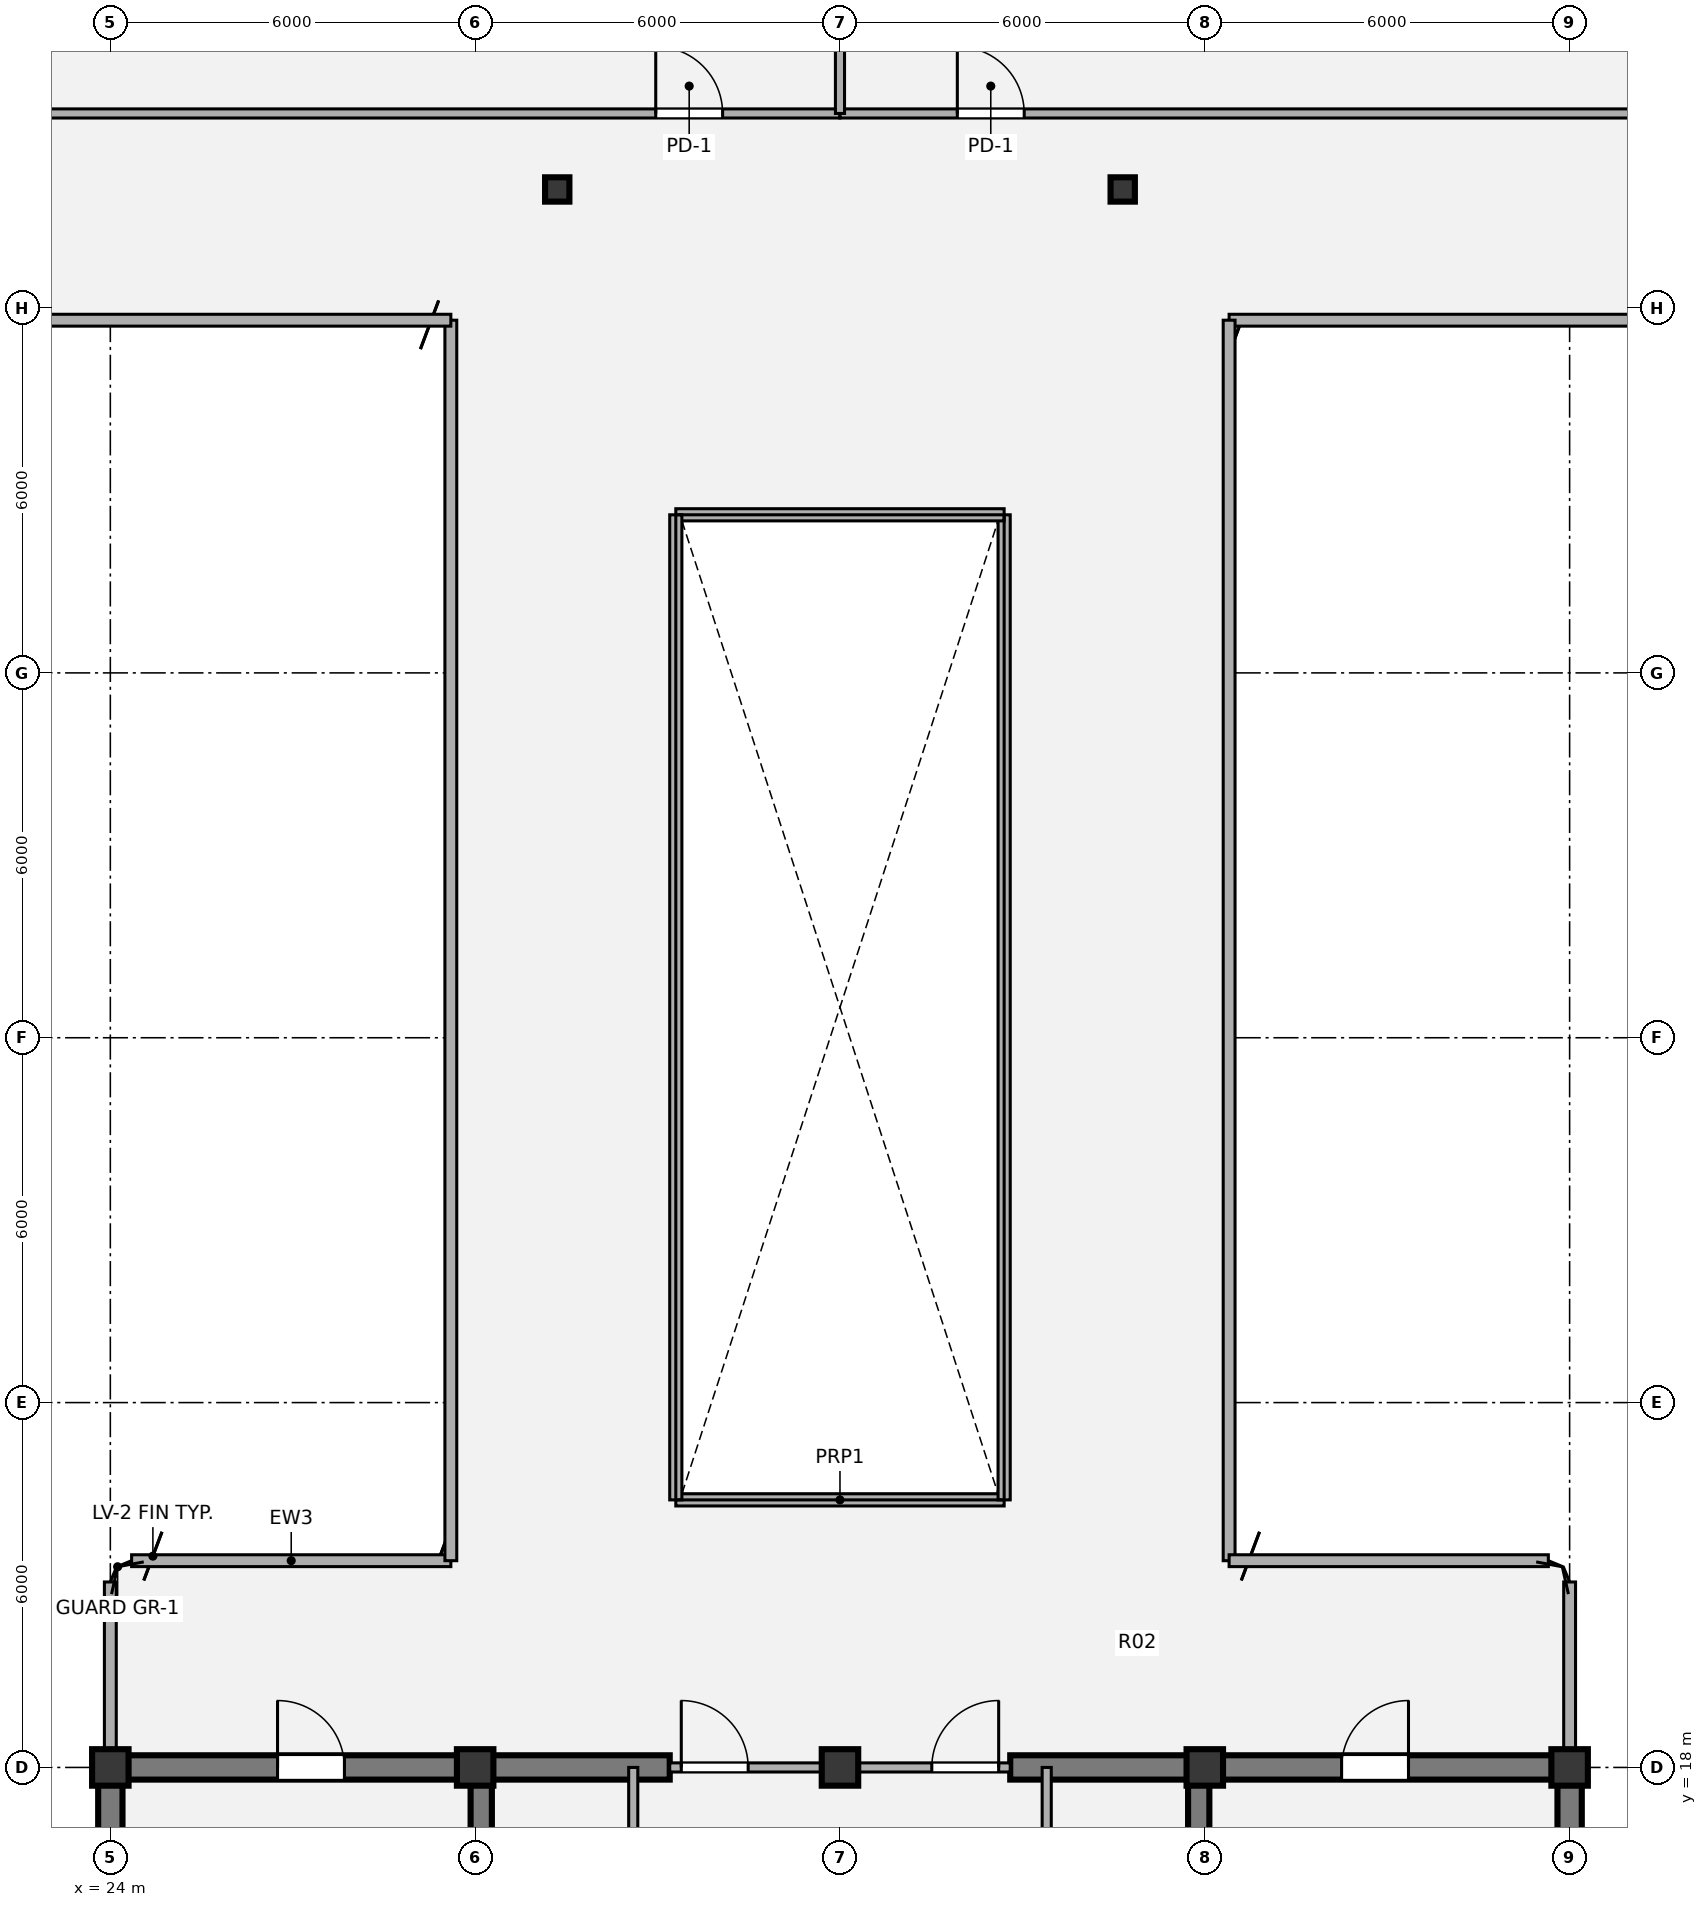
"""IFC4 building model, lengths in metres.
Left out: names, types, materials, properties, quantities, classifications, styles, units other than length and angle.
Written with IfcOpenShell. Run it as: python <this file> out.ifc"""

import sys

from ifc_helpers import new_model, si_unit, direction, frame, frame_2d, origin, origin_2d, place, context, subcontext, project, spatial, rectangle, hollow_rectangle, extrude, source, transform, mapped, element, fill, save


model = new_model("IFC4")
c1 = context("Model", 3, precision=1e-05, world=origin(), true_north=direction((0.0, 1.0)))
c2 = subcontext(c1, "Body", "Model", "MODEL_VIEW")
j1 = project(units=[si_unit("LENGTHUNIT", "METRE"), si_unit("PLANEANGLEUNIT", "RADIAN")], contexts=[c1])
p1 = place(None, origin())
s1 = spatial("IfcSite", under=j1, at=p1, CompositionType="ELEMENT")
p2 = place(p1, origin())
s2 = spatial("IfcBuilding", under=s1, at=p2, CompositionType="ELEMENT")
p3 = place(p2, frame((0.0, 0.0, 295.92)))
s3 = spatial("IfcBuildingStorey", under=s2, at=p3, CompositionType="ELEMENT", Elevation=295.92)
m1 = source(origin(), c2, "Body", "SweptSolid", [
    extrude(rectangle(XDim=0.6, YDim=0.6, at=origin_2d()), origin(), (0.0, 0.0, 1.0), 3.96),
])
for number, where, z_axis, x_axis in (
    (1, (24.0, 18.0, 0.0), (0.0, 0.0, 1.0), (1.0, 0.0, 0.0)),
    (2, (30.0, 18.0, 0.0), (0.0, 0.0, 1.0), (1.0, 0.0, 0.0)),
    (3, (36.0, 18.0, 0.0), (0.0, 0.0, 1.0), (1.0, 0.0, 0.0)),
    (4, (42.0, 18.0, 0.0), (0.0, 0.0, 1.0), (1.0, 0.0, 0.0)),
    (5, (48.0, 18.0, 0.0), (0.0, 0.0, 1.0), (1.0, 0.0, 0.0)),
):
    element("IfcColumn", number, at=place(p3, frame(where, z_axis=z_axis, x_axis=x_axis)), inside=s3, PredefinedType="COLUMN", context=c2, shape_type="MappedRepresentation", body=[
        mapped(m1, transform((0.0, 0.0, 0.0), x_axis=(1.0, 0.0, 0.0), y_axis=(0.0, 1.0, 0.0), z_axis=(0.0, 0.0, 1.0), scale=1.0)),
    ])
for number, where, z_axis, x_axis in (
    (6, (24.0, 6.0, 0.0), (0.0, 0.0, 1.0), (0.0, 1.0, 0.0)),
    (7, (48.0, 18.0, 0.0), (0.0, 0.0, 1.0), (0.0, -1.0, 0.0)),
):
    element("IfcWall", number, at=place(p3, frame(where, z_axis=z_axis, x_axis=x_axis)), inside=s3, PredefinedType="SHEAR", context=c2, shape_type="SweptSolid", body=[
        extrude(rectangle(XDim=12.0, YDim=0.4, at=frame_2d((6.0, 0.0))), origin(), (0.0, 0.0, 1.0), 3.96),
    ])
p4 = place(p3, frame((23.8, 18.0, 0.0), z_axis=(0.0, 0.0, 1.0), x_axis=(1.0, 0.0, 0.0)))
e8 = element("IfcWall", 8, at=p4, inside=s3, PredefinedType="SHEAR", context=c2, shape_type="SweptSolid", body=[
    extrude(rectangle(XDim=9.4, YDim=0.4, at=frame_2d((4.7, 0.0))), origin(), (0.0, 0.0, 1.0), 3.96),
])
p5 = place(p4, frame((2.95, 0.0, 0.0)))
e9 = element("IfcOpeningElement", 9, at=p5, cuts=e8, PredefinedType="OPENING", context=c2, shape_type="SweptSolid", body=[
    extrude(rectangle(XDim=1.1, YDim=2.1, at=origin_2d()), frame((0.55, 0.21, 1.05), z_axis=(0.0, -1.0, 0.0), x_axis=(1.0, 0.0, 0.0)), (0.0, 0.0, 1.0), 0.42),
])
p6 = place(p3, frame((38.8, 18.0, 0.0), z_axis=(0.0, 0.0, 1.0), x_axis=(1.0, 0.0, 0.0)))
e10 = element("IfcWall", 10, at=p6, inside=s3, PredefinedType="SHEAR", context=c2, shape_type="SweptSolid", body=[
    extrude(rectangle(XDim=9.4, YDim=0.4, at=frame_2d((4.7, 0.0))), origin(), (0.0, 0.0, 1.0), 3.96),
])
p7 = place(p6, frame((5.45, 0.0, 0.0)))
e11 = element("IfcOpeningElement", 11, at=p7, cuts=e10, PredefinedType="OPENING", context=c2, shape_type="SweptSolid", body=[
    extrude(rectangle(XDim=1.1, YDim=2.1, at=origin_2d()), frame((0.55, 0.21, 1.05), z_axis=(0.0, -1.0, 0.0), x_axis=(1.0, 0.0, 0.0)), (0.0, 0.0, 1.0), 0.42),
])
for number, where, z_axis, x_axis in (
    (12, (30.1, 6.0, 0.0), (0.0, 0.0, 1.0), (0.0, 1.0, 0.0)),
    (13, (41.9, 18.0, 0.0), (0.0, 0.0, 1.0), (0.0, -1.0, 0.0)),
):
    element("IfcWall", number, at=place(p3, frame(where, z_axis=z_axis, x_axis=x_axis)), inside=s3, PredefinedType="SHEAR", context=c2, shape_type="SweptSolid", body=[
        extrude(rectangle(XDim=12.0, YDim=0.35, at=frame_2d((6.0, 0.0))), origin(), (0.0, 0.0, 1.0), 3.96),
    ])
m2 = source(origin(), c2, "Body", "SweptSolid", [
    extrude(hollow_rectangle(XDim=0.4, YDim=0.4, WallThickness=0.02, OuterFilletRadius=0.04, at=origin_2d()), origin(), (0.0, 0.0, 1.0), 3.96),
])
for number, where, z_axis, x_axis in (
    (14, (31.35, 43.95, 0.0), (0.0, 0.0, 1.0), (1.0, 0.0, 0.0)),
    (15, (40.65, 43.95, 0.0), (0.0, 0.0, 1.0), (1.0, 0.0, 0.0)),
):
    element("IfcColumn", number, at=place(p3, frame(where, z_axis=z_axis, x_axis=x_axis)), inside=s3, PredefinedType="COLUMN", context=c2, shape_type="MappedRepresentation", body=[
        mapped(m2, transform((0.0, 0.0, 0.0), x_axis=(1.0, 0.0, 0.0), y_axis=(0.0, 1.0, 0.0), z_axis=(0.0, 0.0, 1.0), scale=1.0)),
    ])
for number, where, z_axis, x_axis in (
    (16, (48.0, 21.05, 0.0), (0.0, 0.0, 1.0), (0.0, -1.0, 0.0)),
    (17, (24.0, 18.28, 0.0), (0.0, 0.0, 1.0), (0.0, 1.0, 0.0)),
):
    element("IfcWall", number, at=place(p3, frame(where, z_axis=z_axis, x_axis=x_axis)), inside=s3, PredefinedType="SOLIDWALL", context=c2, shape_type="SweptSolid", body=[
        extrude(rectangle(XDim=2.77, YDim=0.195, at=frame_2d((1.385, 0.0))), origin(), (0.0, 0.0, 1.0), 2.898),
    ])
p8 = place(p3, frame((24.35, 21.4, 0.0), z_axis=(0.0, 0.0, 1.0), x_axis=(1.0, 0.0, 0.0)))
e18 = element("IfcWall", 18, at=p8, inside=s3, PredefinedType="SOLIDWALL", context=c2, shape_type="SweptSolid", body=[
    extrude(rectangle(XDim=5.25, YDim=0.195, at=frame_2d((2.625, 0.0))), origin(), (0.0, 0.0, 1.0), 3.71),
])
p9 = place(p3, frame((29.6, 21.4, 0.0), z_axis=(0.0, 0.0, 1.0), x_axis=(0.0, 1.0, 0.0)))
e19 = element("IfcWall", 19, at=p9, inside=s3, PredefinedType="SOLIDWALL", context=c2, shape_type="SweptSolid", body=[
    extrude(rectangle(XDim=20.4, YDim=0.195, at=frame_2d((10.2, 0.0))), origin(), (0.0, 0.0, 1.0), 2.998),
])
for number, where, z_axis, x_axis in (
    (20, (29.6, 41.8, 0.0), (0.0, 0.0, 1.0), (-1.0, 0.0, 0.0)),
    (21, (52.5, 41.8, 0.0), (0.0, 0.0, 1.0), (-1.0, 0.0, 0.0)),
):
    element("IfcWall", number, at=place(p3, frame(where, z_axis=z_axis, x_axis=x_axis)), inside=s3, PredefinedType="SOLIDWALL", context=c2, shape_type="SweptSolid", body=[
        extrude(rectangle(XDim=10.1, YDim=0.195, at=frame_2d((5.05, 0.0))), origin(), (0.0, 0.0, 1.0), 3.71),
    ])
p10 = place(p3, frame((42.4, 41.8, 0.0), z_axis=(0.0, 0.0, 1.0), x_axis=(0.0, -1.0, 0.0)))
e22 = element("IfcWall", 22, at=p10, inside=s3, PredefinedType="SOLIDWALL", context=c2, shape_type="SweptSolid", body=[
    extrude(rectangle(XDim=20.4, YDim=0.195, at=frame_2d((10.2, 0.0))), origin(), (0.0, 0.0, 1.0), 2.998),
])
p11 = place(p3, frame((42.4, 21.4, 0.0), z_axis=(0.0, 0.0, 1.0), x_axis=(1.0, 0.0, 0.0)))
e23 = element("IfcWall", 23, at=p11, inside=s3, PredefinedType="SOLIDWALL", context=c2, shape_type="SweptSolid", body=[
    extrude(rectangle(XDim=5.25, YDim=0.195, at=frame_2d((2.625, 0.0))), origin(), (0.0, 0.0, 1.0), 3.71),
])
p12 = place(p3, frame((33.3, 22.4, 0.0), z_axis=(0.0, 0.0, 1.0), x_axis=(1.0, 0.0, 0.0)))
e24 = element("IfcWall", 24, at=p12, inside=s3, PredefinedType="PARAPET", context=c2, shape_type="SweptSolid", body=[
    extrude(rectangle(XDim=5.4, YDim=0.2, at=frame_2d((2.7, 0.0))), origin(), (0.0, 0.0, 1.0), 1.22),
])
p13 = place(p3, frame((38.7, 22.4, 0.0), z_axis=(0.0, 0.0, 1.0), x_axis=(0.0, 1.0, 0.0)))
e25 = element("IfcWall", 25, at=p13, inside=s3, PredefinedType="PARAPET", context=c2, shape_type="SweptSolid", body=[
    extrude(rectangle(XDim=16.2, YDim=0.2, at=frame_2d((8.1, 0.0))), origin(), (0.0, 0.0, 1.0), 1.22),
])
p14 = place(p3, frame((38.7, 38.6, 0.0), z_axis=(0.0, 0.0, 1.0), x_axis=(-1.0, 0.0, 0.0)))
e26 = element("IfcWall", 26, at=p14, inside=s3, PredefinedType="PARAPET", context=c2, shape_type="SweptSolid", body=[
    extrude(rectangle(XDim=5.4, YDim=0.2, at=frame_2d((2.7, 0.0))), origin(), (0.0, 0.0, 1.0), 1.22),
])
p15 = place(p3, frame((33.3, 38.6, 0.0), z_axis=(0.0, 0.0, 1.0), x_axis=(0.0, -1.0, 0.0)))
e27 = element("IfcWall", 27, at=p15, inside=s3, PredefinedType="PARAPET", context=c2, shape_type="SweptSolid", body=[
    extrude(rectangle(XDim=16.2, YDim=0.2, at=frame_2d((8.1, 0.0))), origin(), (0.0, 0.0, 1.0), 1.22),
])
p16 = place(p3, frame((32.6, 11.0, 0.0), z_axis=(0.0, 0.0, 1.0), x_axis=(0.0, 1.0, 0.0)))
e28 = element("IfcWall", 28, at=p16, inside=s3, PredefinedType="PARTITIONING", context=c2, shape_type="SweptSolid", body=[
    extrude(rectangle(XDim=7.0, YDim=0.15, at=frame_2d((3.5, 0.0))), origin(), (0.0, 0.0, 1.0), 3.68),
])
p17 = place(p16, frame((2.4, 0.0, 0.0)))
e29 = element("IfcOpeningElement", 29, at=p17, cuts=e28, PredefinedType="OPENING", context=c2, shape_type="SweptSolid", body=[
    extrude(rectangle(XDim=1.1, YDim=2.1, at=origin_2d()), frame((0.55, 0.085, 1.05), z_axis=(0.0, -1.0, 0.0), x_axis=(1.0, 0.0, 0.0)), (0.0, 0.0, 1.0), 0.17),
])
p18 = place(p3, frame((39.4, 11.0, 0.0), z_axis=(0.0, 0.0, 1.0), x_axis=(0.0, 1.0, 0.0)))
e30 = element("IfcWall", 30, at=p18, inside=s3, PredefinedType="PARTITIONING", context=c2, shape_type="SweptSolid", body=[
    extrude(rectangle(XDim=7.0, YDim=0.15, at=frame_2d((3.5, 0.0))), origin(), (0.0, 0.0, 1.0), 3.68),
])
p19 = place(p18, frame((2.4, 0.0, 0.0)))
e31 = element("IfcOpeningElement", 31, at=p19, cuts=e30, PredefinedType="OPENING", context=c2, shape_type="SweptSolid", body=[
    extrude(rectangle(XDim=1.1, YDim=2.1, at=origin_2d()), frame((0.55, 0.085, 1.05), z_axis=(0.0, -1.0, 0.0), x_axis=(1.0, 0.0, 0.0)), (0.0, 0.0, 1.0), 0.17),
])
p20 = place(p3, frame((33.2, 18.0, 0.0), z_axis=(0.0, 0.0, 1.0), x_axis=(1.0, 0.0, 0.0)))
e32 = element("IfcWall", 32, at=p20, inside=s3, PredefinedType="PARTITIONING", context=c2, shape_type="SweptSolid", body=[
    extrude(rectangle(XDim=5.6, YDim=0.15, at=frame_2d((2.8, 0.0))), origin(), (0.0, 0.0, 1.0), 2.695),
])
p21 = place(p20, frame((0.19, 0.0, 0.0)))
e33 = element("IfcOpeningElement", 33, at=p21, cuts=e32, PredefinedType="OPENING", context=c2, shape_type="SweptSolid", body=[
    extrude(rectangle(XDim=1.1, YDim=2.1, at=origin_2d()), frame((0.55, 0.085, 1.05), z_axis=(0.0, -1.0, 0.0), x_axis=(1.0, 0.0, 0.0)), (0.0, 0.0, 1.0), 0.17),
])
p22 = place(p20, frame((4.31, 0.0, 0.0)))
e34 = element("IfcOpeningElement", 34, at=p22, cuts=e32, PredefinedType="OPENING", context=c2, shape_type="SweptSolid", body=[
    extrude(rectangle(XDim=1.1, YDim=2.1, at=origin_2d()), frame((0.55, 0.085, 1.05), z_axis=(0.0, -1.0, 0.0), x_axis=(1.0, 0.0, 0.0)), (0.0, 0.0, 1.0), 0.17),
])
p23 = place(p3, frame((18.9, 45.2, 0.0), z_axis=(0.0, 0.0, 1.0), x_axis=(1.0, 0.0, 0.0)))
e35 = element("IfcWall", 35, at=p23, inside=s3, PredefinedType="PARTITIONING", context=c2, shape_type="SweptSolid", body=[
    extrude(rectangle(XDim=17.1, YDim=0.15, at=frame_2d((8.55, 0.0))), origin(), (0.0, 0.0, 1.0), 3.162),
])
p24 = place(p23, frame((14.07, 0.0, 0.0)))
e36 = element("IfcOpeningElement", 36, at=p24, cuts=e35, PredefinedType="OPENING", context=c2, shape_type="SweptSolid", body=[
    extrude(rectangle(XDim=1.1, YDim=2.1, at=origin_2d()), frame((0.55, 0.085, 1.05), z_axis=(0.0, -1.0, 0.0), x_axis=(1.0, 0.0, 0.0)), (0.0, 0.0, 1.0), 0.17),
])
p25 = place(p3, frame((36.0, 45.2, 0.0), z_axis=(0.0, 0.0, 1.0), x_axis=(1.0, 0.0, 0.0)))
e37 = element("IfcWall", 37, at=p25, inside=s3, PredefinedType="PARTITIONING", context=c2, shape_type="SweptSolid", body=[
    extrude(rectangle(XDim=17.1, YDim=0.15, at=frame_2d((8.55, 0.0))), origin(), (0.0, 0.0, 1.0), 3.162),
])
p26 = place(p25, frame((1.93, 0.0, 0.0)))
e38 = element("IfcOpeningElement", 38, at=p26, cuts=e37, PredefinedType="OPENING", context=c2, shape_type="SweptSolid", body=[
    extrude(rectangle(XDim=1.1, YDim=2.1, at=origin_2d()), frame((0.55, 0.085, 1.05), z_axis=(0.0, -1.0, 0.0), x_axis=(1.0, 0.0, 0.0)), (0.0, 0.0, 1.0), 0.17),
])
p27 = place(p3, frame((36.0, 45.2, 0.0), z_axis=(0.0, 0.0, 1.0), x_axis=(0.0, 1.0, 0.0)))
e39 = element("IfcWall", 39, at=p27, inside=s3, PredefinedType="PARTITIONING", context=c2, shape_type="SweptSolid", body=[
    extrude(rectangle(XDim=7.6, YDim=0.15, at=frame_2d((3.8, 0.0))), origin(), (0.0, 0.0, 1.0), 3.68),
])
m3 = source(origin(), c2, "Body", "SweptSolid", [
    extrude(rectangle(XDim=1.1, YDim=2.1, at=origin_2d()), frame((0.55, 0.025, 1.05), z_axis=(0.0, -1.0, 0.0), x_axis=(1.0, 0.0, 0.0)), (0.0, 0.0, 1.0), 0.05),
])
p28 = place(p21, origin())
e40 = element("IfcDoor", 40, at=p28, inside=s3, OperationType="SINGLE_SWING_LEFT", PredefinedType="DOOR", context=c2, shape_type="MappedRepresentation", body=[
    mapped(m3, transform((0.0, 0.0, 0.0), x_axis=(1.0, 0.0, 0.0), y_axis=(0.0, 1.0, 0.0), z_axis=(0.0, 0.0, 1.0), scale=1.0)),
])
fill(e33, e40)
p29 = place(p22, origin())
e41 = element("IfcDoor", 41, at=p29, inside=s3, OperationType="SINGLE_SWING_RIGHT", PredefinedType="DOOR", context=c2, shape_type="MappedRepresentation", body=[
    mapped(m3, transform((0.0, 0.0, 0.0), x_axis=(1.0, 0.0, 0.0), y_axis=(0.0, 1.0, 0.0), z_axis=(0.0, 0.0, 1.0), scale=1.0)),
])
fill(e34, e41)
p30 = place(p5, origin())
e42 = element("IfcDoor", 42, at=p30, inside=s3, OperationType="SINGLE_SWING_LEFT", PredefinedType="DOOR", context=c2, shape_type="MappedRepresentation", body=[
    mapped(m3, transform((0.0, 0.0, 0.0), x_axis=(1.0, 0.0, 0.0), y_axis=(0.0, 1.0, 0.0), z_axis=(0.0, 0.0, 1.0), scale=1.0)),
])
fill(e9, e42)
p31 = place(p7, origin())
e43 = element("IfcDoor", 43, at=p31, inside=s3, OperationType="SINGLE_SWING_RIGHT", PredefinedType="DOOR", context=c2, shape_type="MappedRepresentation", body=[
    mapped(m3, transform((0.0, 0.0, 0.0), x_axis=(1.0, 0.0, 0.0), y_axis=(0.0, 1.0, 0.0), z_axis=(0.0, 0.0, 1.0), scale=1.0)),
])
fill(e11, e43)
m4 = source(origin(), c2, "Body", "SweptSolid", [
    extrude(rectangle(XDim=1.1, YDim=2.1, at=origin_2d()), frame((0.55, 0.025, 1.05), z_axis=(0.0, -1.0, 0.0), x_axis=(1.0, 0.0, 0.0)), (0.0, 0.0, 1.0), 0.05),
])
p32 = place(p24, origin())
e44 = element("IfcDoor", 44, at=p32, inside=s3, OperationType="SINGLE_SWING_LEFT", PredefinedType="DOOR", context=c2, shape_type="MappedRepresentation", body=[
    mapped(m4, transform((0.0, 0.0, 0.0), x_axis=(1.0, 0.0, 0.0), y_axis=(0.0, 1.0, 0.0), z_axis=(0.0, 0.0, 1.0), scale=1.0)),
])
fill(e36, e44)
p33 = place(p26, origin())
e45 = element("IfcDoor", 45, at=p33, inside=s3, OperationType="SINGLE_SWING_LEFT", PredefinedType="DOOR", context=c2, shape_type="MappedRepresentation", body=[
    mapped(m4, transform((0.0, 0.0, 0.0), x_axis=(1.0, 0.0, 0.0), y_axis=(0.0, 1.0, 0.0), z_axis=(0.0, 0.0, 1.0), scale=1.0)),
])
fill(e38, e45)
save(model, sys.argv[1])
